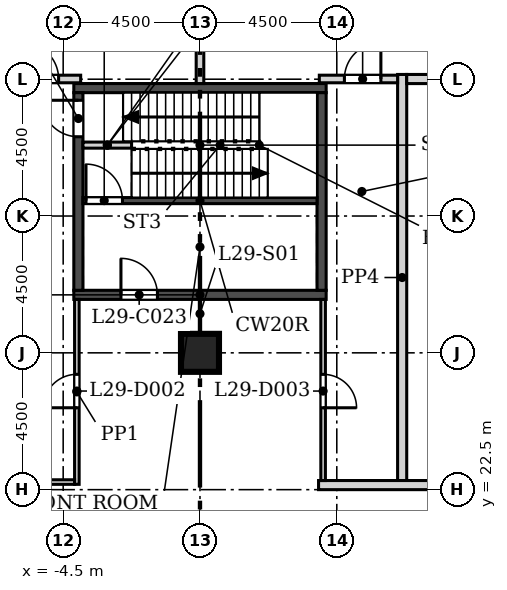
"""IFC4 building model, lengths in metres.
Left out: names, types, materials, properties, quantities, classifications, styles, units other than length and angle.
Written with IfcOpenShell. Run it as: python <this file> out.ifc"""

import sys

from ifc_helpers import new_model, si_unit, direction, frame, frame_2d, origin, origin_2d, place, context, subcontext, project, spatial, rectangle, extrude, element, fill, save


model = new_model("IFC4")
c1 = context("Model", 3, precision=1e-05, world=origin(), true_north=direction((0.0, 1.0)))
c2 = subcontext(c1, "Body", "Model", "MODEL_VIEW")
j1 = project(units=[si_unit("LENGTHUNIT", "METRE"), si_unit("PLANEANGLEUNIT", "RADIAN")], contexts=[c1])
p1 = place(None, origin())
s1 = spatial("IfcSite", under=j1, at=p1, CompositionType="ELEMENT")
p2 = place(p1, origin())
s2 = spatial("IfcBuilding", under=s1, at=p2, CompositionType="ELEMENT")
p3 = place(p2, frame((0.0, 0.0, 132.1)))
s3 = spatial("IfcBuildingStorey", under=s2, at=p3, CompositionType="ELEMENT", Elevation=132.1)
p4 = place(p3, frame((0.0, 27.0, 0.0), z_axis=(0.0, 0.0, 1.0), x_axis=(1.0, 0.0, 0.0)))
e1 = element("IfcColumn", 1, at=p4, inside=s3, PredefinedType="COLUMN", context=c2, shape_type="SweptSolid", body=[
    extrude(rectangle(XDim=1.25, YDim=1.25, at=origin_2d()), origin(), (0.0, 0.0, 1.0), 5.4),
])
p5 = place(p3, frame((29.746, 7.709, 0.0), z_axis=(0.0, 0.0, 1.0), x_axis=(-0.500000700546, 0.866024999324, 0.0)))
e2 = element("IfcWall", 2, at=p5, inside=s3, PredefinedType="SOLIDWALL", context=c2, shape_type="SweptSolid", body=[
    extrude(rectangle(XDim=50.787, YDim=0.34, at=frame_2d((25.393, 0.0))), origin(), (0.0, 0.0, 1.0), 5.0),
])
p6 = place(p5, frame((3.197, 0.0, 0.9)))
e3 = element("IfcOpeningElement", 3, at=p6, cuts=e2, PredefinedType="OPENING", context=c2, shape_type="SweptSolid", body=[
    extrude(rectangle(XDim=1.885, YDim=3.0, at=frame_2d((0.942, 1.5))), frame((0.0, 0.18, 0.0), z_axis=(0.0, -1.0, 0.0), x_axis=(1.0, 0.0, 0.0)), (0.0, 0.0, 1.0), 0.36),
])
p7 = place(p5, frame((6.197, 0.0, 0.9)))
e4 = element("IfcOpeningElement", 4, at=p7, cuts=e2, PredefinedType="OPENING", context=c2, shape_type="SweptSolid", body=[
    extrude(rectangle(XDim=1.885, YDim=3.0, at=frame_2d((0.942, 1.5))), frame((0.0, 0.18, 0.0), z_axis=(0.0, -1.0, 0.0), x_axis=(1.0, 0.0, 0.0)), (0.0, 0.0, 1.0), 0.36),
])
p8 = place(p5, frame((9.197, 0.0, 0.9)))
e5 = element("IfcOpeningElement", 5, at=p8, cuts=e2, PredefinedType="OPENING", context=c2, shape_type="SweptSolid", body=[
    extrude(rectangle(XDim=1.885, YDim=3.0, at=frame_2d((0.942, 1.5))), frame((0.0, 0.18, 0.0), z_axis=(0.0, -1.0, 0.0), x_axis=(1.0, 0.0, 0.0)), (0.0, 0.0, 1.0), 0.36),
])
p9 = place(p5, frame((12.197, 0.0, 0.9)))
e6 = element("IfcOpeningElement", 6, at=p9, cuts=e2, PredefinedType="OPENING", context=c2, shape_type="SweptSolid", body=[
    extrude(rectangle(XDim=1.885, YDim=3.0, at=frame_2d((0.942, 1.5))), frame((0.0, 0.18, 0.0), z_axis=(0.0, -1.0, 0.0), x_axis=(1.0, 0.0, 0.0)), (0.0, 0.0, 1.0), 0.36),
])
p10 = place(p5, frame((15.197, 0.0, 0.9)))
e7 = element("IfcOpeningElement", 7, at=p10, cuts=e2, PredefinedType="OPENING", context=c2, shape_type="SweptSolid", body=[
    extrude(rectangle(XDim=1.885, YDim=3.0, at=frame_2d((0.942, 1.5))), frame((0.0, 0.18, 0.0), z_axis=(0.0, -1.0, 0.0), x_axis=(1.0, 0.0, 0.0)), (0.0, 0.0, 1.0), 0.36),
])
p11 = place(p5, frame((18.197, 0.0, 0.9)))
e8 = element("IfcOpeningElement", 8, at=p11, cuts=e2, PredefinedType="OPENING", context=c2, shape_type="SweptSolid", body=[
    extrude(rectangle(XDim=1.885, YDim=3.0, at=frame_2d((0.942, 1.5))), frame((0.0, 0.18, 0.0), z_axis=(0.0, -1.0, 0.0), x_axis=(1.0, 0.0, 0.0)), (0.0, 0.0, 1.0), 0.36),
])
p12 = place(p5, frame((21.197, 0.0, 0.9)))
e9 = element("IfcOpeningElement", 9, at=p12, cuts=e2, PredefinedType="OPENING", context=c2, shape_type="SweptSolid", body=[
    extrude(rectangle(XDim=1.885, YDim=3.0, at=frame_2d((0.942, 1.5))), frame((0.0, 0.18, 0.0), z_axis=(0.0, -1.0, 0.0), x_axis=(1.0, 0.0, 0.0)), (0.0, 0.0, 1.0), 0.36),
])
p13 = place(p5, frame((24.197, 0.0, 0.9)))
e10 = element("IfcOpeningElement", 10, at=p13, cuts=e2, PredefinedType="OPENING", context=c2, shape_type="SweptSolid", body=[
    extrude(rectangle(XDim=1.885, YDim=3.0, at=frame_2d((0.942, 1.5))), frame((0.0, 0.18, 0.0), z_axis=(0.0, -1.0, 0.0), x_axis=(1.0, 0.0, 0.0)), (0.0, 0.0, 1.0), 0.36),
])
p14 = place(p5, frame((27.197, 0.0, 0.9)))
e11 = element("IfcOpeningElement", 11, at=p14, cuts=e2, PredefinedType="OPENING", context=c2, shape_type="SweptSolid", body=[
    extrude(rectangle(XDim=1.885, YDim=3.0, at=frame_2d((0.942, 1.5))), frame((0.0, 0.18, 0.0), z_axis=(0.0, -1.0, 0.0), x_axis=(1.0, 0.0, 0.0)), (0.0, 0.0, 1.0), 0.36),
])
p15 = place(p5, frame((30.197, 0.0, 0.9)))
e12 = element("IfcOpeningElement", 12, at=p15, cuts=e2, PredefinedType="OPENING", context=c2, shape_type="SweptSolid", body=[
    extrude(rectangle(XDim=1.885, YDim=3.0, at=frame_2d((0.942, 1.5))), frame((0.0, 0.18, 0.0), z_axis=(0.0, -1.0, 0.0), x_axis=(1.0, 0.0, 0.0)), (0.0, 0.0, 1.0), 0.36),
])
p16 = place(p5, frame((33.197, 0.0, 0.9)))
e13 = element("IfcOpeningElement", 13, at=p16, cuts=e2, PredefinedType="OPENING", context=c2, shape_type="SweptSolid", body=[
    extrude(rectangle(XDim=1.885, YDim=3.0, at=frame_2d((0.942, 1.5))), frame((0.0, 0.18, 0.0), z_axis=(0.0, -1.0, 0.0), x_axis=(1.0, 0.0, 0.0)), (0.0, 0.0, 1.0), 0.36),
])
p17 = place(p5, frame((36.197, 0.0, 0.9)))
e14 = element("IfcOpeningElement", 14, at=p17, cuts=e2, PredefinedType="OPENING", context=c2, shape_type="SweptSolid", body=[
    extrude(rectangle(XDim=1.885, YDim=3.0, at=frame_2d((0.942, 1.5))), frame((0.0, 0.18, 0.0), z_axis=(0.0, -1.0, 0.0), x_axis=(1.0, 0.0, 0.0)), (0.0, 0.0, 1.0), 0.36),
])
p18 = place(p5, frame((39.197, 0.0, 0.9)))
e15 = element("IfcOpeningElement", 15, at=p18, cuts=e2, PredefinedType="OPENING", context=c2, shape_type="SweptSolid", body=[
    extrude(rectangle(XDim=1.885, YDim=3.0, at=frame_2d((0.942, 1.5))), frame((0.0, 0.18, 0.0), z_axis=(0.0, -1.0, 0.0), x_axis=(1.0, 0.0, 0.0)), (0.0, 0.0, 1.0), 0.36),
])
p19 = place(p5, frame((42.197, 0.0, 0.9)))
e16 = element("IfcOpeningElement", 16, at=p19, cuts=e2, PredefinedType="OPENING", context=c2, shape_type="SweptSolid", body=[
    extrude(rectangle(XDim=1.885, YDim=3.0, at=frame_2d((0.942, 1.5))), frame((0.0, 0.18, 0.0), z_axis=(0.0, -1.0, 0.0), x_axis=(1.0, 0.0, 0.0)), (0.0, 0.0, 1.0), 0.36),
])
p20 = place(p5, frame((45.197, 0.0, 0.9)))
e17 = element("IfcOpeningElement", 17, at=p20, cuts=e2, PredefinedType="OPENING", context=c2, shape_type="SweptSolid", body=[
    extrude(rectangle(XDim=1.885, YDim=3.0, at=frame_2d((0.942, 1.5))), frame((0.0, 0.18, 0.0), z_axis=(0.0, -1.0, 0.0), x_axis=(1.0, 0.0, 0.0)), (0.0, 0.0, 1.0), 0.36),
])
p21 = place(p3, frame((-4.353, 51.692, 0.0), z_axis=(0.0, 0.0, 1.0), x_axis=(-0.500000700546, -0.866024999324, 0.0)))
e18 = element("IfcWall", 18, at=p21, inside=s3, PredefinedType="SOLIDWALL", context=c2, shape_type="SweptSolid", body=[
    extrude(rectangle(XDim=50.787, YDim=0.34, at=frame_2d((25.393, 0.0))), origin(), (0.0, 0.0, 1.0), 5.0),
])
p22 = place(p21, frame((3.59, 0.0, 0.9)))
e19 = element("IfcOpeningElement", 19, at=p22, cuts=e18, PredefinedType="OPENING", context=c2, shape_type="SweptSolid", body=[
    extrude(rectangle(XDim=1.885, YDim=3.0, at=frame_2d((0.942, 1.5))), frame((0.0, 0.18, 0.0), z_axis=(0.0, -1.0, 0.0), x_axis=(1.0, 0.0, 0.0)), (0.0, 0.0, 1.0), 0.36),
])
p23 = place(p21, frame((6.59, 0.0, 0.9)))
e20 = element("IfcOpeningElement", 20, at=p23, cuts=e18, PredefinedType="OPENING", context=c2, shape_type="SweptSolid", body=[
    extrude(rectangle(XDim=1.885, YDim=3.0, at=frame_2d((0.942, 1.5))), frame((0.0, 0.18, 0.0), z_axis=(0.0, -1.0, 0.0), x_axis=(1.0, 0.0, 0.0)), (0.0, 0.0, 1.0), 0.36),
])
p24 = place(p21, frame((9.59, 0.0, 0.9)))
e21 = element("IfcOpeningElement", 21, at=p24, cuts=e18, PredefinedType="OPENING", context=c2, shape_type="SweptSolid", body=[
    extrude(rectangle(XDim=1.885, YDim=3.0, at=frame_2d((0.942, 1.5))), frame((0.0, 0.18, 0.0), z_axis=(0.0, -1.0, 0.0), x_axis=(1.0, 0.0, 0.0)), (0.0, 0.0, 1.0), 0.36),
])
p25 = place(p21, frame((12.59, 0.0, 0.9)))
e22 = element("IfcOpeningElement", 22, at=p25, cuts=e18, PredefinedType="OPENING", context=c2, shape_type="SweptSolid", body=[
    extrude(rectangle(XDim=1.885, YDim=3.0, at=frame_2d((0.942, 1.5))), frame((0.0, 0.18, 0.0), z_axis=(0.0, -1.0, 0.0), x_axis=(1.0, 0.0, 0.0)), (0.0, 0.0, 1.0), 0.36),
])
p26 = place(p21, frame((15.59, 0.0, 0.9)))
e23 = element("IfcOpeningElement", 23, at=p26, cuts=e18, PredefinedType="OPENING", context=c2, shape_type="SweptSolid", body=[
    extrude(rectangle(XDim=1.885, YDim=3.0, at=frame_2d((0.942, 1.5))), frame((0.0, 0.18, 0.0), z_axis=(0.0, -1.0, 0.0), x_axis=(1.0, 0.0, 0.0)), (0.0, 0.0, 1.0), 0.36),
])
p27 = place(p21, frame((18.59, 0.0, 0.9)))
e24 = element("IfcOpeningElement", 24, at=p27, cuts=e18, PredefinedType="OPENING", context=c2, shape_type="SweptSolid", body=[
    extrude(rectangle(XDim=1.885, YDim=3.0, at=frame_2d((0.942, 1.5))), frame((0.0, 0.18, 0.0), z_axis=(0.0, -1.0, 0.0), x_axis=(1.0, 0.0, 0.0)), (0.0, 0.0, 1.0), 0.36),
])
p28 = place(p21, frame((21.59, 0.0, 0.9)))
e25 = element("IfcOpeningElement", 25, at=p28, cuts=e18, PredefinedType="OPENING", context=c2, shape_type="SweptSolid", body=[
    extrude(rectangle(XDim=1.885, YDim=3.0, at=frame_2d((0.942, 1.5))), frame((0.0, 0.18, 0.0), z_axis=(0.0, -1.0, 0.0), x_axis=(1.0, 0.0, 0.0)), (0.0, 0.0, 1.0), 0.36),
])
p29 = place(p21, frame((24.59, 0.0, 0.9)))
e26 = element("IfcOpeningElement", 26, at=p29, cuts=e18, PredefinedType="OPENING", context=c2, shape_type="SweptSolid", body=[
    extrude(rectangle(XDim=1.885, YDim=3.0, at=frame_2d((0.942, 1.5))), frame((0.0, 0.18, 0.0), z_axis=(0.0, -1.0, 0.0), x_axis=(1.0, 0.0, 0.0)), (0.0, 0.0, 1.0), 0.36),
])
p30 = place(p21, frame((27.59, 0.0, 0.9)))
e27 = element("IfcOpeningElement", 27, at=p30, cuts=e18, PredefinedType="OPENING", context=c2, shape_type="SweptSolid", body=[
    extrude(rectangle(XDim=1.885, YDim=3.0, at=frame_2d((0.942, 1.5))), frame((0.0, 0.18, 0.0), z_axis=(0.0, -1.0, 0.0), x_axis=(1.0, 0.0, 0.0)), (0.0, 0.0, 1.0), 0.36),
])
p31 = place(p21, frame((30.59, 0.0, 0.9)))
e28 = element("IfcOpeningElement", 28, at=p31, cuts=e18, PredefinedType="OPENING", context=c2, shape_type="SweptSolid", body=[
    extrude(rectangle(XDim=1.885, YDim=3.0, at=frame_2d((0.942, 1.5))), frame((0.0, 0.18, 0.0), z_axis=(0.0, -1.0, 0.0), x_axis=(1.0, 0.0, 0.0)), (0.0, 0.0, 1.0), 0.36),
])
p32 = place(p21, frame((33.59, 0.0, 0.9)))
e29 = element("IfcOpeningElement", 29, at=p32, cuts=e18, PredefinedType="OPENING", context=c2, shape_type="SweptSolid", body=[
    extrude(rectangle(XDim=1.885, YDim=3.0, at=frame_2d((0.942, 1.5))), frame((0.0, 0.18, 0.0), z_axis=(0.0, -1.0, 0.0), x_axis=(1.0, 0.0, 0.0)), (0.0, 0.0, 1.0), 0.36),
])
p33 = place(p21, frame((36.59, 0.0, 0.9)))
e30 = element("IfcOpeningElement", 30, at=p33, cuts=e18, PredefinedType="OPENING", context=c2, shape_type="SweptSolid", body=[
    extrude(rectangle(XDim=1.885, YDim=3.0, at=frame_2d((0.942, 1.5))), frame((0.0, 0.18, 0.0), z_axis=(0.0, -1.0, 0.0), x_axis=(1.0, 0.0, 0.0)), (0.0, 0.0, 1.0), 0.36),
])
p34 = place(p21, frame((39.59, 0.0, 0.9)))
e31 = element("IfcOpeningElement", 31, at=p34, cuts=e18, PredefinedType="OPENING", context=c2, shape_type="SweptSolid", body=[
    extrude(rectangle(XDim=1.885, YDim=3.0, at=frame_2d((0.942, 1.5))), frame((0.0, 0.18, 0.0), z_axis=(0.0, -1.0, 0.0), x_axis=(1.0, 0.0, 0.0)), (0.0, 0.0, 1.0), 0.36),
])
p35 = place(p21, frame((42.59, 0.0, 0.9)))
e32 = element("IfcOpeningElement", 32, at=p35, cuts=e18, PredefinedType="OPENING", context=c2, shape_type="SweptSolid", body=[
    extrude(rectangle(XDim=1.885, YDim=3.0, at=frame_2d((0.942, 1.5))), frame((0.0, 0.18, 0.0), z_axis=(0.0, -1.0, 0.0), x_axis=(1.0, 0.0, 0.0)), (0.0, 0.0, 1.0), 0.36),
])
p36 = place(p21, frame((45.59, 0.0, 0.9)))
e33 = element("IfcOpeningElement", 33, at=p36, cuts=e18, PredefinedType="OPENING", context=c2, shape_type="SweptSolid", body=[
    extrude(rectangle(XDim=1.885, YDim=3.0, at=frame_2d((0.942, 1.5))), frame((0.0, 0.18, 0.0), z_axis=(0.0, -1.0, 0.0), x_axis=(1.0, 0.0, 0.0)), (0.0, 0.0, 1.0), 0.36),
])
p37 = place(p3, frame((-4.15, 28.907, -0.4), z_axis=(0.0, 0.0, 1.0), x_axis=(1.0, 0.0, 0.0)))
e34 = element("IfcWall", 34, at=p37, inside=s3, PredefinedType="SOLIDWALL", context=c2, shape_type="SweptSolid", body=[
    extrude(rectangle(XDim=8.3, YDim=0.3, at=frame_2d((4.15, 0.0))), origin(), (0.0, 0.0, 1.0), 5.4),
])
p38 = place(p37, frame((1.55, 0.0, 0.4)))
e35 = element("IfcOpeningElement", 35, at=p38, cuts=e34, PredefinedType="OPENING", context=c2, shape_type="SweptSolid", body=[
    extrude(rectangle(XDim=1.2, YDim=2.1, at=frame_2d((0.6, 1.05))), frame((0.0, 0.16, 0.0), z_axis=(0.0, -1.0, 0.0), x_axis=(1.0, 0.0, 0.0)), (0.0, 0.0, 1.0), 0.32),
])
p39 = place(p3, frame((-4.15, 35.707, -0.4), z_axis=(0.0, 0.0, 1.0), x_axis=(1.0, 0.0, 0.0)))
e36 = element("IfcWall", 36, at=p39, inside=s3, PredefinedType="SOLIDWALL", context=c2, shape_type="SweptSolid", body=[
    extrude(rectangle(XDim=8.3, YDim=0.3, at=frame_2d((4.15, 0.0))), origin(), (0.0, 0.0, 1.0), 5.4),
])
p40 = place(p3, frame((-4.0, 29.057, -0.4), z_axis=(0.0, 0.0, 1.0), x_axis=(0.0, 1.0, 0.0)))
e37 = element("IfcWall", 37, at=p40, inside=s3, PredefinedType="SOLIDWALL", context=c2, shape_type="SweptSolid", body=[
    extrude(rectangle(XDim=6.5, YDim=0.3, at=frame_2d((3.25, 0.0))), origin(), (0.0, 0.0, 1.0), 5.4),
])
p41 = place(p40, frame((5.05, 0.0, 0.4)))
e38 = element("IfcOpeningElement", 38, at=p41, cuts=e37, PredefinedType="OPENING", context=c2, shape_type="SweptSolid", body=[
    extrude(rectangle(XDim=1.2, YDim=2.1, at=frame_2d((0.6, 1.05))), frame((0.0, 0.16, 0.0), z_axis=(0.0, -1.0, 0.0), x_axis=(1.0, 0.0, 0.0)), (0.0, 0.0, 1.0), 0.32),
])
p42 = place(p3, frame((4.0, 29.057, -0.4), z_axis=(0.0, 0.0, 1.0), x_axis=(0.0, 1.0, 0.0)))
e39 = element("IfcWall", 39, at=p42, inside=s3, PredefinedType="SOLIDWALL", context=c2, shape_type="SweptSolid", body=[
    extrude(rectangle(XDim=6.5, YDim=0.3, at=frame_2d((3.25, 0.0))), origin(), (0.0, 0.0, 1.0), 5.4),
])
p43 = place(p3, frame((-3.85, 32.007, -0.4), z_axis=(0.0, 0.0, 1.0), x_axis=(1.0, 0.0, 0.0)))
e40 = element("IfcWall", 40, at=p43, inside=s3, PredefinedType="SOLIDWALL", context=c2, shape_type="SweptSolid", body=[
    extrude(rectangle(XDim=7.7, YDim=0.2, at=frame_2d((3.85, 0.0))), origin(), (0.0, 0.0, 1.0), 5.4),
])
p44 = place(p43, frame((0.1, 0.0, 0.4)))
e41 = element("IfcOpeningElement", 41, at=p44, cuts=e40, PredefinedType="OPENING", context=c2, shape_type="SweptSolid", body=[
    extrude(rectangle(XDim=1.2, YDim=2.1, at=frame_2d((0.6, 1.05))), frame((0.0, 0.11, 0.0), z_axis=(0.0, -1.0, 0.0), x_axis=(1.0, 0.0, 0.0)), (0.0, 0.0, 1.0), 0.22),
])
p45 = place(p3, frame((-3.85, 33.832, 0.0), z_axis=(0.0, 0.0, 1.0), x_axis=(1.0, 0.0, 0.0)))
e42 = element("IfcWall", 42, at=p45, inside=s3, PredefinedType="SOLIDWALL", context=c2, shape_type="SweptSolid", body=[
    extrude(rectangle(XDim=1.6, YDim=0.2, at=frame_2d((0.8, 0.0))), origin(), (0.0, 0.0, 1.0), 5.0),
])
p46 = place(p3, frame((6.65, 36.156, 0.0), z_axis=(0.0, 0.0, 1.0), x_axis=(0.0, -1.0, 0.0)))
e43 = element("IfcWall", 43, at=p46, inside=s3, PredefinedType="SOLIDWALL", context=c2, shape_type="SweptSolid", body=[
    extrude(rectangle(XDim=13.357, YDim=0.3, at=frame_2d((6.678, 0.0))), origin(), (0.0, 0.0, 1.0), 5.0),
])
p47 = place(p3, frame((3.9, 22.65, 0.0), z_axis=(0.0, 0.0, 1.0), x_axis=(1.0, 0.0, 0.0)))
e44 = element("IfcWall", 44, at=p47, inside=s3, PredefinedType="SOLIDWALL", context=c2, shape_type="SweptSolid", body=[
    extrude(rectangle(XDim=7.767, YDim=0.3, at=frame_2d((3.884, 0.0))), origin(), (0.0, 0.0, 1.0), 5.0),
])
p48 = place(p3, frame((-4.05, 22.675, 0.0), z_axis=(0.0, 0.0, 1.0), x_axis=(0.0, 1.0, 0.0)))
e45 = element("IfcWall", 45, at=p48, inside=s3, PredefinedType="PARTITIONING", context=c2, shape_type="SweptSolid", body=[
    extrude(rectangle(XDim=6.082, YDim=0.15, at=frame_2d((3.041, 0.0))), origin(), (0.0, 0.0, 1.0), 5.0),
])
p49 = place(p48, frame((2.519, 0.0, 0.0)))
e46 = element("IfcOpeningElement", 46, at=p49, cuts=e45, PredefinedType="OPENING", context=c2, shape_type="SweptSolid", body=[
    extrude(rectangle(XDim=1.1, YDim=2.1, at=frame_2d((0.55, 1.05))), frame((0.0, 0.085, 0.0), z_axis=(0.0, -1.0, 0.0), x_axis=(1.0, 0.0, 0.0)), (0.0, 0.0, 1.0), 0.17),
])
p50 = place(p3, frame((4.05, 28.757, 0.0), z_axis=(0.0, 0.0, 1.0), x_axis=(0.0, -1.0, 0.0)))
e47 = element("IfcWall", 47, at=p50, inside=s3, PredefinedType="PARTITIONING", context=c2, shape_type="SweptSolid", body=[
    extrude(rectangle(XDim=5.957, YDim=0.15, at=frame_2d((2.979, 0.0))), origin(), (0.0, 0.0, 1.0), 5.0),
])
p51 = place(p50, frame((2.464, 0.0, 0.0)))
e48 = element("IfcOpeningElement", 48, at=p51, cuts=e47, PredefinedType="OPENING", context=c2, shape_type="SweptSolid", body=[
    extrude(rectangle(XDim=1.1, YDim=2.1, at=frame_2d((0.55, 1.05))), frame((0.0, 0.085, 0.0), z_axis=(0.0, -1.0, 0.0), x_axis=(1.0, 0.0, 0.0)), (0.0, 0.0, 1.0), 0.17),
])
p52 = place(p3, frame((3.925, 36.007, 0.0), z_axis=(0.0, 0.0, 1.0), x_axis=(1.0, 0.0, 0.0)))
e49 = element("IfcWall", 49, at=p52, inside=s3, PredefinedType="SOLIDWALL", context=c2, shape_type="SweptSolid", body=[
    extrude(rectangle(XDim=2.575, YDim=0.25, at=frame_2d((1.288, 0.0))), origin(), (0.0, 0.0, 1.0), 4.1),
])
p53 = place(p52, frame((0.825, 0.0, 0.0)))
e50 = element("IfcOpeningElement", 50, at=p53, cuts=e49, PredefinedType="OPENING", context=c2, shape_type="SweptSolid", body=[
    extrude(rectangle(XDim=1.2, YDim=2.1, at=frame_2d((0.6, 1.05))), frame((0.0, 0.135, 0.0), z_axis=(0.0, -1.0, 0.0), x_axis=(1.0, 0.0, 0.0)), (0.0, 0.0, 1.0), 0.27),
])
p54 = place(p3, frame((-6.325, 36.007, 0.0), z_axis=(0.0, 0.0, 1.0), x_axis=(1.0, 0.0, 0.0)))
e51 = element("IfcWall", 51, at=p54, inside=s3, PredefinedType="SOLIDWALL", context=c2, shape_type="SweptSolid", body=[
    extrude(rectangle(XDim=2.4, YDim=0.25, at=frame_2d((1.2, 0.0))), origin(), (0.0, 0.0, 1.0), 4.1),
])
p55 = place(p54, frame((0.475, 0.0, 0.0)))
e52 = element("IfcOpeningElement", 52, at=p55, cuts=e51, PredefinedType="OPENING", context=c2, shape_type="SweptSolid", body=[
    extrude(rectangle(XDim=1.2, YDim=2.1, at=frame_2d((0.6, 1.05))), frame((0.0, 0.135, 0.0), z_axis=(0.0, -1.0, 0.0), x_axis=(1.0, 0.0, 0.0)), (0.0, 0.0, 1.0), 0.27),
])
p56 = place(p3, frame((-6.3, 22.75, 0.0), z_axis=(0.0, 0.0, 1.0), x_axis=(1.0, 0.0, 0.0)))
e53 = element("IfcWall", 53, at=p56, inside=s3, PredefinedType="PARTITIONING", context=c2, shape_type="SweptSolid", body=[
    extrude(rectangle(XDim=2.175, YDim=0.15, at=frame_2d((1.087, 0.0))), origin(), (0.0, 0.0, 1.0), 5.0),
])
p57 = place(p3, frame((0.0, 44.947, 0.0), z_axis=(0.0, 0.0, 1.0), x_axis=(0.0, -1.0, 0.0)))
e54 = element("IfcWall", 54, at=p57, inside=s3, PredefinedType="SOLIDWALL", context=c2, shape_type="SweptSolid", body=[
    extrude(rectangle(XDim=9.09, YDim=0.25, at=frame_2d((4.545, 0.0))), origin(), (0.0, 0.0, 1.0), 4.25),
])
p58 = place(p3, frame((10.758, 36.006, 0.0), z_axis=(0.0, 0.0, 1.0), x_axis=(-1.0, 0.0, 0.0)))
e55 = element("IfcWall", 55, at=p58, inside=s3, PredefinedType="SOLIDWALL", context=c2, shape_type="SweptSolid", body=[
    extrude(rectangle(XDim=3.958, YDim=0.3, at=frame_2d((1.979, 0.0))), origin(), (0.0, 0.0, 1.0), 4.1),
])
p59 = place(p38, origin())
e56 = element("IfcDoor", 56, at=p59, inside=s3, OperationType="SINGLE_SWING_LEFT", PredefinedType="DOOR", context=c2, shape_type="SweptSolid", body=[
    extrude(rectangle(XDim=1.2, YDim=2.1, at=frame_2d((0.6, 1.05))), frame((0.0, 0.025, 0.0), z_axis=(0.0, -1.0, 0.0), x_axis=(1.0, 0.0, 0.0)), (0.0, 0.0, 1.0), 0.05),
])
fill(e35, e56)
p60 = place(p44, origin())
e57 = element("IfcDoor", 57, at=p60, inside=s3, OperationType="SINGLE_SWING_LEFT", PredefinedType="DOOR", context=c2, shape_type="SweptSolid", body=[
    extrude(rectangle(XDim=1.2, YDim=2.1, at=frame_2d((0.6, 1.05))), frame((0.0, 0.025, 0.0), z_axis=(0.0, -1.0, 0.0), x_axis=(1.0, 0.0, 0.0)), (0.0, 0.0, 1.0), 0.05),
])
fill(e41, e57)
p61 = place(p41, origin())
e58 = element("IfcDoor", 58, at=p61, inside=s3, OperationType="SINGLE_SWING_RIGHT", PredefinedType="DOOR", context=c2, shape_type="SweptSolid", body=[
    extrude(rectangle(XDim=1.2, YDim=2.1, at=frame_2d((0.6, 1.05))), frame((0.0, 0.025, 0.0), z_axis=(0.0, -1.0, 0.0), x_axis=(1.0, 0.0, 0.0)), (0.0, 0.0, 1.0), 0.05),
])
fill(e38, e58)
p62 = place(p49, origin())
e59 = element("IfcDoor", 59, at=p62, inside=s3, OperationType="SINGLE_SWING_LEFT", PredefinedType="DOOR", context=c2, shape_type="SweptSolid", body=[
    extrude(rectangle(XDim=1.1, YDim=2.1, at=frame_2d((0.55, 1.05))), frame((0.0, 0.025, 0.0), z_axis=(0.0, -1.0, 0.0), x_axis=(1.0, 0.0, 0.0)), (0.0, 0.0, 1.0), 0.05),
])
fill(e46, e59)
p63 = place(p51, origin())
e60 = element("IfcDoor", 60, at=p63, inside=s3, OperationType="SINGLE_SWING_RIGHT", PredefinedType="DOOR", context=c2, shape_type="SweptSolid", body=[
    extrude(rectangle(XDim=1.1, YDim=2.1, at=frame_2d((0.55, 1.05))), frame((0.0, 0.025, 0.0), z_axis=(0.0, -1.0, 0.0), x_axis=(1.0, 0.0, 0.0)), (0.0, 0.0, 1.0), 0.05),
])
fill(e48, e60)
p64 = place(p55, origin())
e61 = element("IfcDoor", 61, at=p64, inside=s3, OperationType="SINGLE_SWING_LEFT", PredefinedType="DOOR", context=c2, shape_type="SweptSolid", body=[
    extrude(rectangle(XDim=1.2, YDim=2.1, at=frame_2d((0.6, 1.05))), frame((0.0, 0.025, 0.0), z_axis=(0.0, -1.0, 0.0), x_axis=(1.0, 0.0, 0.0)), (0.0, 0.0, 1.0), 0.05),
])
fill(e52, e61)
p65 = place(p53, origin())
e62 = element("IfcDoor", 62, at=p65, inside=s3, OperationType="SINGLE_SWING_RIGHT", PredefinedType="DOOR", context=c2, shape_type="SweptSolid", body=[
    extrude(rectangle(XDim=1.2, YDim=2.1, at=frame_2d((0.6, 1.05))), frame((0.0, 0.025, 0.0), z_axis=(0.0, -1.0, 0.0), x_axis=(1.0, 0.0, 0.0)), (0.0, 0.0, 1.0), 0.05),
])
fill(e50, e62)
save(model, sys.argv[1])
